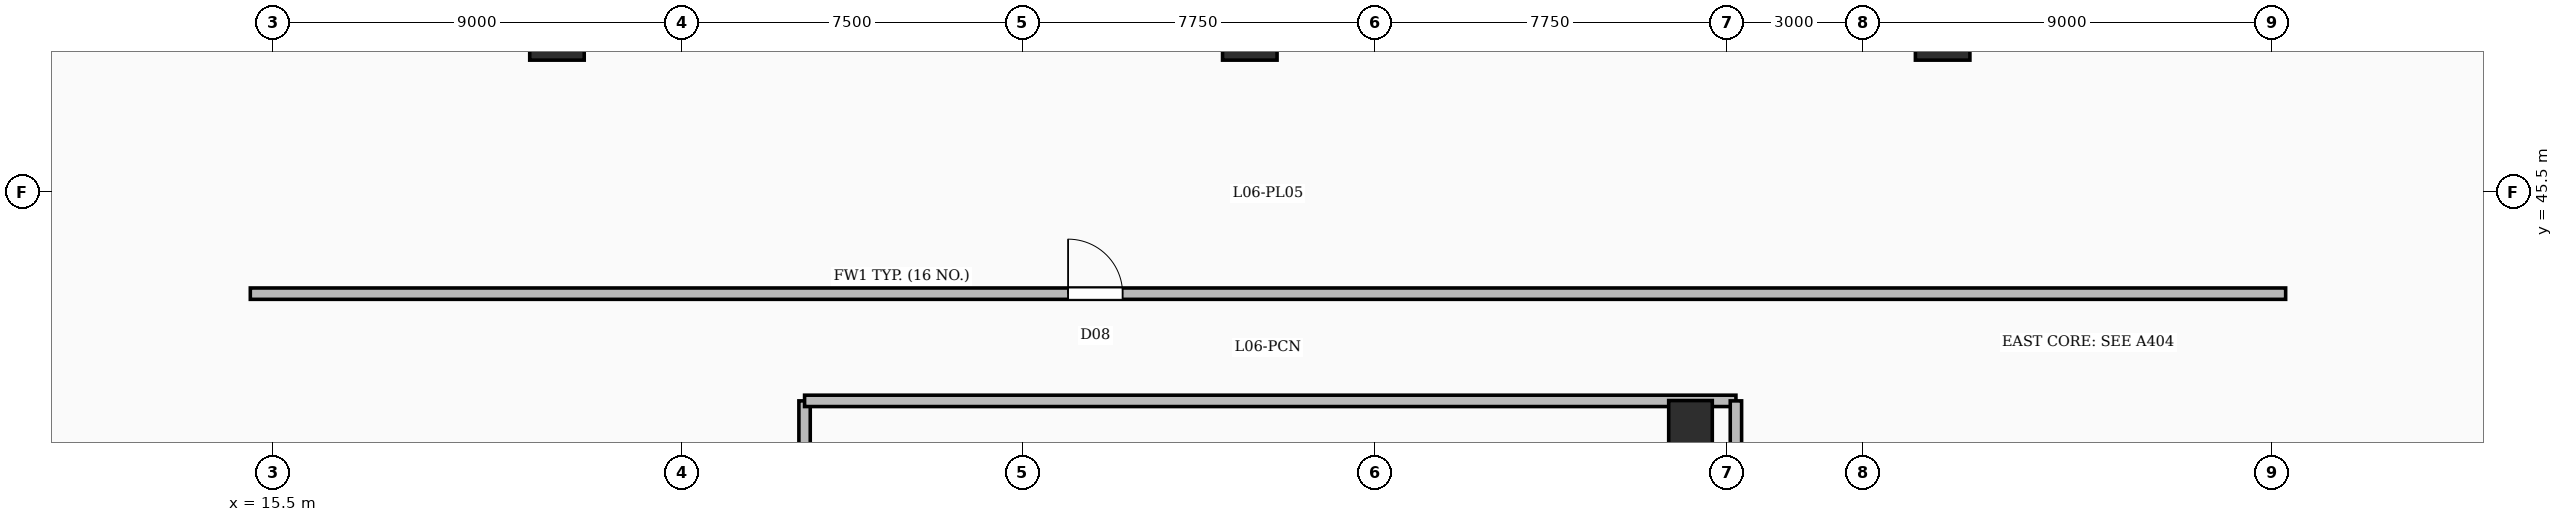
"""IFC4 building model, lengths in metres.
Left out: names, types, materials, properties, quantities, classifications, styles, units other than length and angle.
Written with IfcOpenShell. Run it as: python <this file> out.ifc"""

import sys

from ifc_helpers import new_model, si_unit, direction, frame, frame_2d, origin, origin_2d, place, context, subcontext, project, spatial, rectangle, circle, extrude, element, fill, save


model = new_model("IFC4")
c1 = context("Model", 3, precision=1e-05, world=origin(), true_north=direction((0.0, 1.0)))
c2 = subcontext(c1, "Body", "Model", "MODEL_VIEW")
j1 = project(units=[si_unit("LENGTHUNIT", "METRE"), si_unit("PLANEANGLEUNIT", "RADIAN")], contexts=[c1])
p1 = place(None, origin())
s1 = spatial("IfcSite", under=j1, at=p1, CompositionType="ELEMENT")
p2 = place(p1, origin())
s2 = spatial("IfcBuilding", under=s1, at=p2, CompositionType="ELEMENT")
p3 = place(p2, frame((0.0, 0.0, 34.0)))
s3 = spatial("IfcBuildingStorey", under=s2, at=p3, CompositionType="ELEMENT", Elevation=34.0)
for number, where, z_axis, x_axis in (
    (1, (52.25, 48.85, -0.45), (0.0, 0.0, 1.0), (1.0, 0.0, 0.0)),
    (2, (37.0, 48.85, -0.45), (0.0, 0.0, 1.0), (1.0, 0.0, 0.0)),
    (3, (21.75, 48.85, -0.45), (0.0, 0.0, 1.0), (1.0, 0.0, 0.0)),
):
    element("IfcColumn", number, at=place(p3, frame(where, z_axis=z_axis, x_axis=x_axis)), inside=s3, PredefinedType="COLUMN", context=c2, shape_type="SweptSolid", body=[
        extrude(rectangle(XDim=1.2, YDim=0.9, at=origin_2d()), origin(), (0.0, 0.0, 1.0), 8.0),
    ])
p4 = place(p3, frame((46.7, 40.427, -0.069), z_axis=(-0.266118192043, -0.648222430351, 0.713434502007), x_axis=(0.925077995153, -0.379777175306, 0.0)))
e4 = element("IfcColumn", 4, at=p4, inside=s3, PredefinedType="COLUMN", context=c2, shape_type="SweptSolid", body=[
    extrude(circle(Radius=0.48, at=origin_2d()), origin(), (0.0, 0.0, 1.0), 10.146),
])
p5 = place(p3, frame((15.0, 43.26, 0.0), z_axis=(0.0, 0.0, 1.0), x_axis=(1.0, 0.0, 0.0)))
e5 = element("IfcWall", 5, at=p5, inside=s3, PredefinedType="SOLIDWALL", context=c2, shape_type="SweptSolid", body=[
    extrude(rectangle(XDim=44.8, YDim=0.25, at=frame_2d((22.4, 0.0))), origin(), (0.0, 0.0, 1.0), 6.61),
])
p6 = place(p5, frame((18.0, 0.0, 0.0)))
e6 = element("IfcOpeningElement", 6, at=p6, cuts=e5, PredefinedType="OPENING", context=c2, shape_type="SweptSolid", body=[
    extrude(rectangle(XDim=1.2, YDim=2.2, at=frame_2d((0.6, 1.1))), frame((0.0, 0.135, 0.0), z_axis=(0.0, -1.0, 0.0), x_axis=(1.0, 0.0, 0.0)), (0.0, 0.0, 1.0), 0.27),
])
p7 = place(p3, frame((27.2, 40.9, 0.0), z_axis=(0.0, 0.0, 1.0), x_axis=(1.0, 0.0, 0.0)))
e7 = element("IfcWall", 7, at=p7, inside=s3, PredefinedType="SOLIDWALL", context=c2, shape_type="SweptSolid", body=[
    extrude(rectangle(XDim=20.5, YDim=0.25, at=frame_2d((10.25, 0.0))), origin(), (0.0, 0.0, 1.0), 6.61),
])
for number, where, z_axis, x_axis in (
    (8, (27.2, 15.4, 0.0), (0.0, 0.0, 1.0), (0.0, 1.0, 0.0)),
    (9, (47.7, 15.4, 0.0), (0.0, 0.0, 1.0), (0.0, 1.0, 0.0)),
):
    element("IfcWall", number, at=place(p3, frame(where, z_axis=z_axis, x_axis=x_axis)), inside=s3, PredefinedType="SOLIDWALL", context=c2, shape_type="SweptSolid", body=[
        extrude(rectangle(XDim=25.5, YDim=0.25, at=frame_2d((12.75, 0.0))), origin(), (0.0, 0.0, 1.0), 6.61),
    ])
p8 = place(p6, origin())
e10 = element("IfcDoor", 10, at=p8, inside=s3, OperationType="SINGLE_SWING_LEFT", PredefinedType="DOOR", context=c2, shape_type="SweptSolid", body=[
    extrude(rectangle(XDim=1.2, YDim=2.2, at=frame_2d((0.6, 1.1))), frame((0.0, 0.025, 0.0), z_axis=(0.0, -1.0, 0.0), x_axis=(1.0, 0.0, 0.0)), (0.0, 0.0, 1.0), 0.05),
])
fill(e6, e10)
save(model, sys.argv[1])
